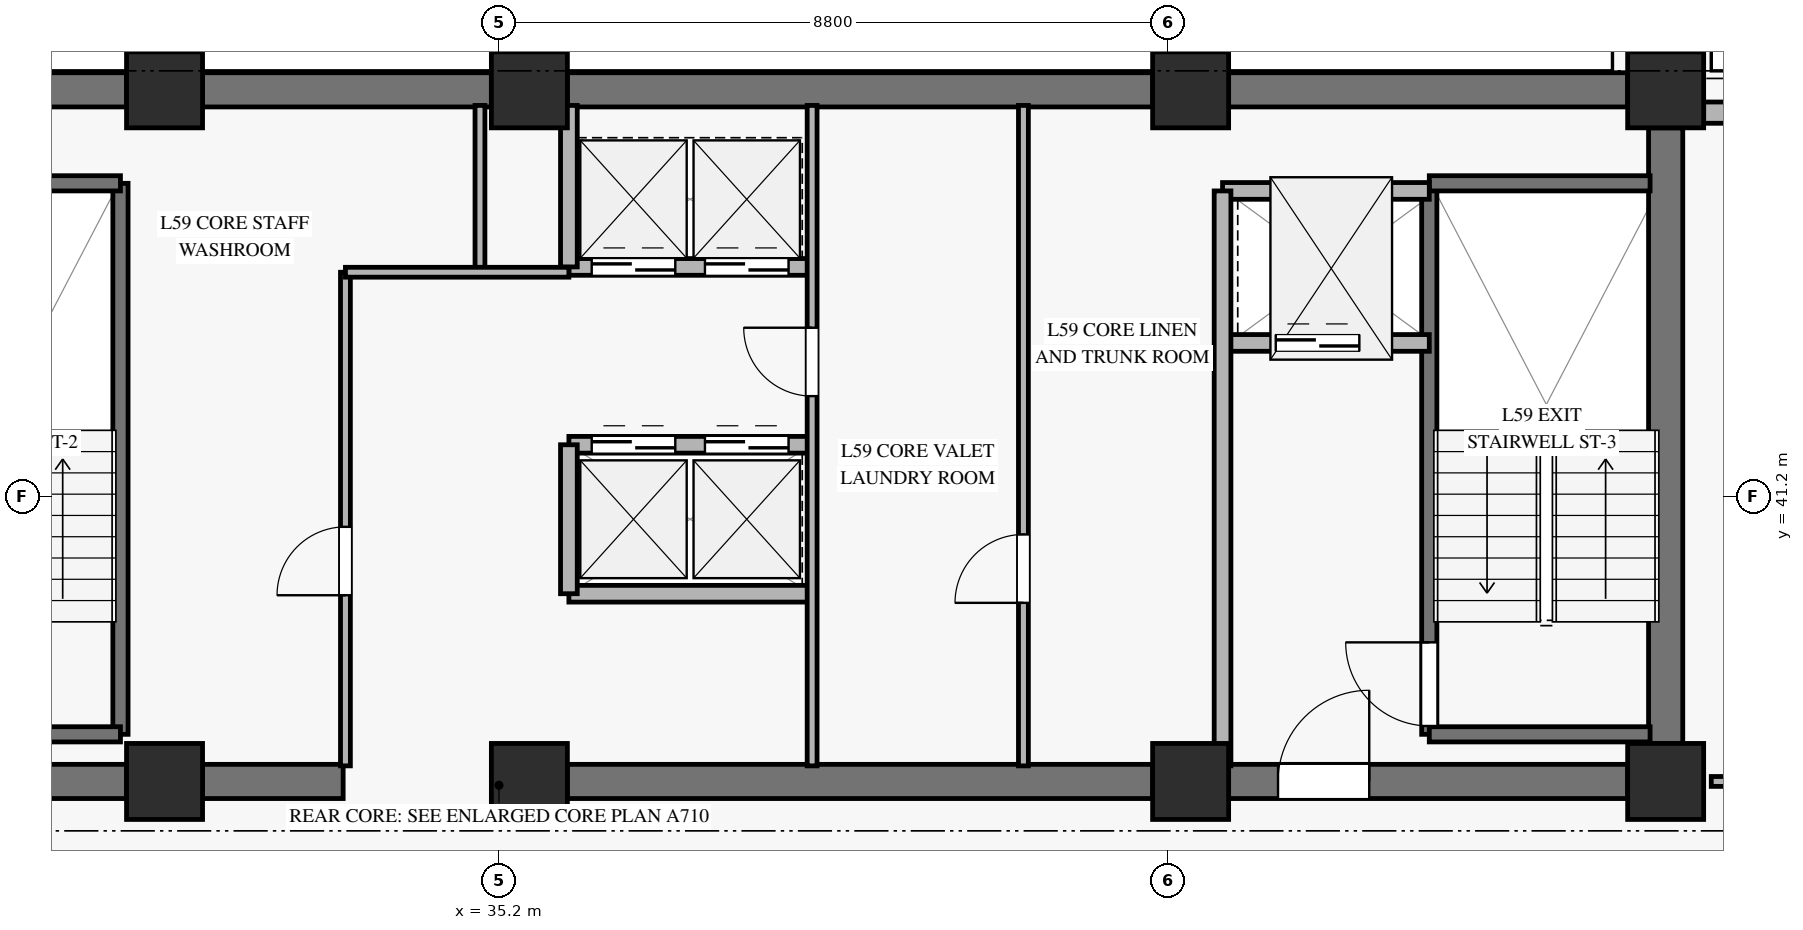
"""IFC4 building model, lengths in metres.
Left out: names, types, materials, properties, quantities, classifications, styles, units other than length and angle.
Written with IfcOpenShell. Run it as: python <this file> out.ifc"""

import sys

from ifc_helpers import new_model, si_unit, direction, frame, frame_2d, origin, origin_2d, place, context, subcontext, project, spatial, rectangle, extrude, source, transform, mapped, element, fill, save


model = new_model("IFC4")
c1 = context("Model", 3, precision=1e-05, world=origin(), true_north=direction((0.0, 1.0)))
c2 = subcontext(c1, "Body", "Model", "MODEL_VIEW")
j1 = project(units=[si_unit("LENGTHUNIT", "METRE"), si_unit("PLANEANGLEUNIT", "RADIAN")], contexts=[c1])
p1 = place(None, origin())
s1 = spatial("IfcSite", under=j1, at=p1, CompositionType="ELEMENT")
p2 = place(p1, origin())
s2 = spatial("IfcBuilding", under=s1, at=p2, CompositionType="ELEMENT")
p3 = place(p2, frame((0.0, 0.0, 233.8)))
s3 = spatial("IfcBuildingStorey", under=s2, at=p3, CompositionType="ELEMENT", Elevation=233.8)
m1 = source(origin(), c2, "Body", "SweptSolid", [
    extrude(rectangle(XDim=1.0, YDim=1.0, at=origin_2d()), origin(), (0.0, 0.0, 1.0), 3.12),
])
for number, where, z_axis, x_axis in (
    (1, (30.8, 37.45, 0.0), (0.0, 0.0, 1.0), (1.0, 0.0, 0.0)),
    (2, (30.8, 46.55, 0.0), (0.0, 0.0, 1.0), (1.0, 0.0, 0.0)),
    (3, (35.6, 37.45, 0.0), (0.0, 0.0, 1.0), (1.0, 0.0, 0.0)),
    (4, (35.6, 46.55, 0.0), (0.0, 0.0, 1.0), (1.0, 0.0, 0.0)),
    (5, (44.3, 37.45, 0.0), (0.0, 0.0, 1.0), (1.0, 0.0, 0.0)),
    (6, (44.3, 46.55, 0.0), (0.0, 0.0, 1.0), (1.0, 0.0, 0.0)),
    (7, (50.55, 37.45, 0.0), (0.0, 0.0, 1.0), (1.0, 0.0, 0.0)),
    (8, (50.55, 46.55, 0.0), (0.0, 0.0, 1.0), (1.0, 0.0, 0.0)),
):
    element("IfcColumn", number, at=place(p3, frame(where, z_axis=z_axis, x_axis=x_axis)), inside=s3, PredefinedType="PILASTER", context=c2, shape_type="MappedRepresentation", body=[
        mapped(m1, transform((0.0, 0.0, 0.0), x_axis=(1.0, 0.0, 0.0), y_axis=(0.0, 1.0, 0.0), z_axis=(0.0, 0.0, 1.0), scale=1.0)),
    ])
p4 = place(p3, frame((20.35, 46.55, 0.0), z_axis=(0.0, 0.0, 1.0), x_axis=(1.0, 0.0, 0.0)))
e9 = element("IfcWall", 9, at=p4, inside=s3, PredefinedType="SHEAR", context=c2, shape_type="SweptSolid", body=[
    extrude(rectangle(XDim=9.95, YDim=0.45, at=frame_2d((4.975, 0.0))), origin(), (0.0, 0.0, 1.0), 3.12),
])
p5 = place(p3, frame((31.3, 46.55, 0.0), z_axis=(0.0, 0.0, 1.0), x_axis=(1.0, 0.0, 0.0)))
e10 = element("IfcWall", 10, at=p5, inside=s3, PredefinedType="SHEAR", context=c2, shape_type="SweptSolid", body=[
    extrude(rectangle(XDim=3.8, YDim=0.45, at=frame_2d((1.9, 0.0))), origin(), (0.0, 0.0, 1.0), 3.12),
])
p6 = place(p3, frame((36.1, 46.55, 0.0), z_axis=(0.0, 0.0, 1.0), x_axis=(1.0, 0.0, 0.0)))
e11 = element("IfcWall", 11, at=p6, inside=s3, PredefinedType="SHEAR", context=c2, shape_type="SweptSolid", body=[
    extrude(rectangle(XDim=7.7, YDim=0.45, at=frame_2d((3.85, 0.0))), origin(), (0.0, 0.0, 1.0), 3.12),
])
p7 = place(p3, frame((44.8, 46.55, 0.0), z_axis=(0.0, 0.0, 1.0), x_axis=(1.0, 0.0, 0.0)))
e12 = element("IfcWall", 12, at=p7, inside=s3, PredefinedType="SHEAR", context=c2, shape_type="SweptSolid", body=[
    extrude(rectangle(XDim=5.25, YDim=0.45, at=frame_2d((2.625, 0.0))), origin(), (0.0, 0.0, 1.0), 3.12),
])
p8 = place(p3, frame((20.35, 37.45, 0.0), z_axis=(0.0, 0.0, 1.0), x_axis=(1.0, 0.0, 0.0)))
e13 = element("IfcWall", 13, at=p8, inside=s3, PredefinedType="SHEAR", context=c2, shape_type="SweptSolid", body=[
    extrude(rectangle(XDim=9.95, YDim=0.45, at=frame_2d((4.975, 0.0))), origin(), (0.0, 0.0, 1.0), 3.12),
])
p9 = place(p8, frame((4.2, 0.0, 0.0)))
e14 = element("IfcOpeningElement", 14, at=p9, cuts=e13, PredefinedType="OPENING", context=c2, shape_type="SweptSolid", body=[
    extrude(rectangle(XDim=1.2, YDim=2.15, at=frame_2d((0.6, 1.075))), frame((0.0, 0.235, 0.0), z_axis=(0.0, -1.0, 0.0), x_axis=(1.0, 0.0, 0.0)), (0.0, 0.0, 1.0), 0.47),
])
p10 = place(p3, frame((31.3, 37.45, 0.0), z_axis=(0.0, 0.0, 1.0), x_axis=(1.0, 0.0, 0.0)))
e15 = element("IfcWall", 15, at=p10, inside=s3, PredefinedType="SHEAR", context=c2, shape_type="SweptSolid", body=[
    extrude(rectangle(XDim=1.85, YDim=0.45, at=frame_2d((0.925, 0.0))), origin(), (0.0, 0.0, 1.0), 3.12),
])
p11 = place(p3, frame((36.1, 37.45, 0.0), z_axis=(0.0, 0.0, 1.0), x_axis=(1.0, 0.0, 0.0)))
e16 = element("IfcWall", 16, at=p11, inside=s3, PredefinedType="SHEAR", context=c2, shape_type="SweptSolid", body=[
    extrude(rectangle(XDim=7.7, YDim=0.45, at=frame_2d((3.85, 0.0))), origin(), (0.0, 0.0, 1.0), 3.12),
])
p12 = place(p3, frame((44.8, 37.45, 0.0), z_axis=(0.0, 0.0, 1.0), x_axis=(1.0, 0.0, 0.0)))
e17 = element("IfcWall", 17, at=p12, inside=s3, PredefinedType="SHEAR", context=c2, shape_type="SweptSolid", body=[
    extrude(rectangle(XDim=5.25, YDim=0.45, at=frame_2d((2.625, 0.0))), origin(), (0.0, 0.0, 1.0), 3.12),
])
p13 = place(p12, frame((0.65, 0.0, 0.0)))
e18 = element("IfcOpeningElement", 18, at=p13, cuts=e17, PredefinedType="OPENING", context=c2, shape_type="SweptSolid", body=[
    extrude(rectangle(XDim=1.2, YDim=2.15, at=frame_2d((0.6, 1.075))), frame((0.0, 0.235, 0.0), z_axis=(0.0, -1.0, 0.0), x_axis=(1.0, 0.0, 0.0)), (0.0, 0.0, 1.0), 0.47),
])
p14 = place(p3, frame((50.55, 37.95, 0.0), z_axis=(0.0, 0.0, 1.0), x_axis=(0.0, 1.0, 0.0)))
e19 = element("IfcWall", 19, at=p14, inside=s3, PredefinedType="SHEAR", context=c2, shape_type="SweptSolid", body=[
    extrude(rectangle(XDim=8.1, YDim=0.45, at=frame_2d((4.05, 0.0))), origin(), (0.0, 0.0, 1.0), 3.12),
])
p15 = place(p3, frame((51.05, 46.25, 0.0), z_axis=(0.0, 0.0, 1.0), x_axis=(1.0, 0.0, 0.0)))
e20 = element("IfcWall", 20, at=p15, inside=s3, PredefinedType="SOLIDWALL", context=c2, shape_type="SweptSolid", body=[
    extrude(rectangle(XDim=8.81, YDim=0.28, at=frame_2d((4.405, 0.0))), origin(), (0.0, 0.0, 1.0), 2.75),
])
p16 = place(p15, frame((3.605, 0.0, 0.45)))
e21 = element("IfcOpeningElement", 21, at=p16, cuts=e20, PredefinedType="OPENING", context=c2, shape_type="SweptSolid", body=[
    extrude(rectangle(XDim=1.6, YDim=2.0, at=frame_2d((0.8, 1.0))), frame((0.0, 0.15, 0.0), z_axis=(0.0, -1.0, 0.0), x_axis=(1.0, 0.0, 0.0)), (0.0, 0.0, 1.0), 0.3),
])
p17 = place(p3, frame((30.22, 38.07, 0.0), z_axis=(0.0, 0.0, 1.0), x_axis=(0.0, 1.0, 0.0)))
e22 = element("IfcWall", 22, at=p17, inside=s3, PredefinedType="SOLIDWALL", context=c2, shape_type="SweptSolid", body=[
    extrude(rectangle(XDim=7.25, YDim=0.2, at=frame_2d((3.625, 0.0))), origin(), (0.0, 0.0, 1.0), 3.4),
])
for number, where, z_axis, x_axis in (
    (23, (27.14, 45.32, 0.0), (0.0, 0.0, 1.0), (1.0, 0.0, 0.0)),
    (24, (27.14, 38.07, 0.0), (0.0, 0.0, 1.0), (1.0, 0.0, 0.0)),
):
    element("IfcWall", number, at=place(p3, frame(where, z_axis=z_axis, x_axis=x_axis)), inside=s3, PredefinedType="SOLIDWALL", context=c2, shape_type="SweptSolid", body=[
        extrude(rectangle(XDim=3.08, YDim=0.2, at=frame_2d((1.54, 0.0))), origin(), (0.0, 0.0, 1.0), 3.4),
    ])
p18 = place(p3, frame((47.44, 38.07, 0.0), z_axis=(0.0, 0.0, 1.0), x_axis=(0.0, 1.0, 0.0)))
e25 = element("IfcWall", 25, at=p18, inside=s3, PredefinedType="SOLIDWALL", context=c2, shape_type="SweptSolid", body=[
    extrude(rectangle(XDim=7.25, YDim=0.2, at=frame_2d((3.625, 0.0))), origin(), (0.0, 0.0, 1.0), 3.4),
])
p19 = place(p18, frame((0.11, 0.0, 0.0)))
e26 = element("IfcOpeningElement", 26, at=p19, cuts=e25, PredefinedType="OPENING", context=c2, shape_type="SweptSolid", body=[
    extrude(rectangle(XDim=1.1, YDim=2.15, at=frame_2d((0.55, 1.075))), frame((0.0, 0.11, 0.0), z_axis=(0.0, -1.0, 0.0), x_axis=(1.0, 0.0, 0.0)), (0.0, 0.0, 1.0), 0.22),
])
for number, where, z_axis, x_axis in (
    (27, (47.44, 45.32, 0.0), (0.0, 0.0, 1.0), (1.0, 0.0, 0.0)),
    (28, (47.44, 38.07, 0.0), (0.0, 0.0, 1.0), (1.0, 0.0, 0.0)),
):
    element("IfcWall", number, at=place(p3, frame(where, z_axis=z_axis, x_axis=x_axis)), inside=s3, PredefinedType="SOLIDWALL", context=c2, shape_type="SweptSolid", body=[
        extrude(rectangle(XDim=2.905, YDim=0.2, at=frame_2d((1.453, 0.0))), origin(), (0.0, 0.0, 1.0), 3.4),
    ])
p20 = place(p3, frame((44.72, 43.22, 0.0), z_axis=(0.0, 0.0, 1.0), x_axis=(1.0, 0.0, 0.0)))
e29 = element("IfcWall", 29, at=p20, inside=s3, PredefinedType="SOLIDWALL", context=c2, shape_type="SweptSolid", body=[
    extrude(rectangle(XDim=2.72, YDim=0.22, at=frame_2d((1.36, 0.0))), origin(), (0.0, 0.0, 1.0), 3.12),
])
p21 = place(p20, frame((0.7, 0.0, 0.0)))
e30 = element("IfcOpeningElement", 30, at=p21, cuts=e29, PredefinedType="OPENING", context=c2, shape_type="SweptSolid", body=[
    extrude(rectangle(XDim=1.1, YDim=2.2, at=frame_2d((0.55, 1.1))), frame((0.0, 0.12, 0.0), z_axis=(0.0, -1.0, 0.0), x_axis=(1.0, 0.0, 0.0)), (0.0, 0.0, 1.0), 0.24),
])
p22 = place(p3, frame((44.72, 45.22, 0.0), z_axis=(0.0, 0.0, 1.0), x_axis=(1.0, 0.0, 0.0)))
e31 = element("IfcWall", 31, at=p22, inside=s3, PredefinedType="SOLIDWALL", context=c2, shape_type="SweptSolid", body=[
    extrude(rectangle(XDim=2.72, YDim=0.22, at=frame_2d((1.36, 0.0))), origin(), (0.0, 0.0, 1.0), 3.12),
])
p23 = place(p3, frame((44.72, 37.655, 0.0), z_axis=(0.0, 0.0, 1.0), x_axis=(0.0, 1.0, 0.0)))
e32 = element("IfcWall", 32, at=p23, inside=s3, PredefinedType="SOLIDWALL", context=c2, shape_type="SweptSolid", body=[
    extrude(rectangle(XDim=7.565, YDim=0.22, at=frame_2d((3.782, 0.0))), origin(), (0.0, 0.0, 1.0), 3.12),
])
p24 = place(p3, frame((36.12, 44.22, 0.0), z_axis=(0.0, 0.0, 1.0), x_axis=(1.0, 0.0, 0.0)))
e33 = element("IfcWall", 33, at=p24, inside=s3, PredefinedType="SOLIDWALL", context=c2, shape_type="SweptSolid", body=[
    extrude(rectangle(XDim=3.2, YDim=0.22, at=frame_2d((1.6, 0.0))), origin(), (0.0, 0.0, 1.0), 3.12),
])
p25 = place(p24, frame((0.3, 0.0, 0.0)))
e34 = element("IfcOpeningElement", 34, at=p25, cuts=e33, PredefinedType="OPENING", context=c2, shape_type="SweptSolid", body=[
    extrude(rectangle(XDim=1.1, YDim=2.2, at=frame_2d((0.55, 1.1))), frame((0.0, 0.12, 0.0), z_axis=(0.0, -1.0, 0.0), x_axis=(1.0, 0.0, 0.0)), (0.0, 0.0, 1.0), 0.24),
])
p26 = place(p24, frame((1.79, 0.0, 0.0)))
e35 = element("IfcOpeningElement", 35, at=p26, cuts=e33, PredefinedType="OPENING", context=c2, shape_type="SweptSolid", body=[
    extrude(rectangle(XDim=1.1, YDim=2.2, at=frame_2d((0.55, 1.1))), frame((0.0, 0.12, 0.0), z_axis=(0.0, -1.0, 0.0), x_axis=(1.0, 0.0, 0.0)), (0.0, 0.0, 1.0), 0.24),
])
p27 = place(p3, frame((36.12, 41.88, 0.0), z_axis=(0.0, 0.0, 1.0), x_axis=(1.0, 0.0, 0.0)))
e36 = element("IfcWall", 36, at=p27, inside=s3, PredefinedType="SOLIDWALL", context=c2, shape_type="SweptSolid", body=[
    extrude(rectangle(XDim=3.2, YDim=0.22, at=frame_2d((1.6, 0.0))), origin(), (0.0, 0.0, 1.0), 3.12),
])
p28 = place(p27, frame((0.3, 0.0, 0.0)))
e37 = element("IfcOpeningElement", 37, at=p28, cuts=e36, PredefinedType="OPENING", context=c2, shape_type="SweptSolid", body=[
    extrude(rectangle(XDim=1.1, YDim=2.2, at=frame_2d((0.55, 1.1))), frame((0.0, 0.12, 0.0), z_axis=(0.0, -1.0, 0.0), x_axis=(1.0, 0.0, 0.0)), (0.0, 0.0, 1.0), 0.24),
])
p29 = place(p27, frame((1.79, 0.0, 0.0)))
e38 = element("IfcOpeningElement", 38, at=p29, cuts=e36, PredefinedType="OPENING", context=c2, shape_type="SweptSolid", body=[
    extrude(rectangle(XDim=1.1, YDim=2.2, at=frame_2d((0.55, 1.1))), frame((0.0, 0.12, 0.0), z_axis=(0.0, -1.0, 0.0), x_axis=(1.0, 0.0, 0.0)), (0.0, 0.0, 1.0), 0.24),
])
p30 = place(p3, frame((36.12, 39.92, 0.0), z_axis=(0.0, 0.0, 1.0), x_axis=(1.0, 0.0, 0.0)))
e39 = element("IfcWall", 39, at=p30, inside=s3, PredefinedType="SOLIDWALL", context=c2, shape_type="SweptSolid", body=[
    extrude(rectangle(XDim=3.2, YDim=0.22, at=frame_2d((1.6, 0.0))), origin(), (0.0, 0.0, 1.0), 3.12),
])
p31 = place(p3, frame((36.12, 39.92, 0.0), z_axis=(0.0, 0.0, 1.0), x_axis=(0.0, 1.0, 0.0)))
e40 = element("IfcWall", 40, at=p31, inside=s3, PredefinedType="SOLIDWALL", context=c2, shape_type="SweptSolid", body=[
    extrude(rectangle(XDim=1.96, YDim=0.22, at=frame_2d((0.98, 0.0))), origin(), (0.0, 0.0, 1.0), 3.12),
])
p32 = place(p3, frame((36.12, 44.22, 0.0), z_axis=(0.0, 0.0, 1.0), x_axis=(0.0, 1.0, 0.0)))
e41 = element("IfcWall", 41, at=p32, inside=s3, PredefinedType="SOLIDWALL", context=c2, shape_type="SweptSolid", body=[
    extrude(rectangle(XDim=2.125, YDim=0.22, at=frame_2d((1.062, 0.0))), origin(), (0.0, 0.0, 1.0), 3.12),
])
p33 = place(p3, frame((33.18, 37.655, 0.0), z_axis=(0.0, 0.0, 1.0), x_axis=(0.0, 1.0, 0.0)))
e42 = element("IfcWall", 42, at=p33, inside=s3, PredefinedType="PARTITIONING", context=c2, shape_type="SweptSolid", body=[
    extrude(rectangle(XDim=6.495, YDim=0.13, at=frame_2d((3.248, 0.0))), origin(), (0.0, 0.0, 1.0), 2.22),
])
p34 = place(p33, frame((2.245, 0.0, 0.0)))
e43 = element("IfcOpeningElement", 43, at=p34, cuts=e42, PredefinedType="OPENING", context=c2, shape_type="SweptSolid", body=[
    extrude(rectangle(XDim=0.9, YDim=2.1, at=frame_2d((0.45, 1.05))), frame((0.0, 0.075, 0.0), z_axis=(0.0, -1.0, 0.0), x_axis=(1.0, 0.0, 0.0)), (0.0, 0.0, 1.0), 0.15),
])
p35 = place(p3, frame((34.95, 44.15, 0.0), z_axis=(0.0, 0.0, 1.0), x_axis=(0.0, 1.0, 0.0)))
e44 = element("IfcWall", 44, at=p35, inside=s3, PredefinedType="PARTITIONING", context=c2, shape_type="SweptSolid", body=[
    extrude(rectangle(XDim=2.195, YDim=0.13, at=frame_2d((1.098, 0.0))), origin(), (0.0, 0.0, 1.0), 3.12),
])
p36 = place(p3, frame((33.18, 44.15, 0.0), z_axis=(0.0, 0.0, 1.0), x_axis=(1.0, 0.0, 0.0)))
e45 = element("IfcWall", 45, at=p36, inside=s3, PredefinedType="PARTITIONING", context=c2, shape_type="SweptSolid", body=[
    extrude(rectangle(XDim=2.94, YDim=0.13, at=frame_2d((1.47, 0.0))), origin(), (0.0, 0.0, 1.0), 2.405),
])
p37 = place(p3, frame((39.32, 37.655, 0.0), z_axis=(0.0, 0.0, 1.0), x_axis=(0.0, 1.0, 0.0)))
e46 = element("IfcWall", 46, at=p37, inside=s3, PredefinedType="PARTITIONING", context=c2, shape_type="SweptSolid", body=[
    extrude(rectangle(XDim=8.69, YDim=0.13, at=frame_2d((4.345, 0.0))), origin(), (0.0, 0.0, 1.0), 3.12),
])
p38 = place(p37, frame((4.865, 0.0, 0.0)))
e47 = element("IfcOpeningElement", 47, at=p38, cuts=e46, PredefinedType="OPENING", context=c2, shape_type="SweptSolid", body=[
    extrude(rectangle(XDim=0.9, YDim=2.1, at=frame_2d((0.45, 1.05))), frame((0.0, 0.075, 0.0), z_axis=(0.0, -1.0, 0.0), x_axis=(1.0, 0.0, 0.0)), (0.0, 0.0, 1.0), 0.15),
])
p39 = place(p3, frame((42.1, 37.655, 0.0), z_axis=(0.0, 0.0, 1.0), x_axis=(0.0, 1.0, 0.0)))
e48 = element("IfcWall", 48, at=p39, inside=s3, PredefinedType="PARTITIONING", context=c2, shape_type="SweptSolid", body=[
    extrude(rectangle(XDim=8.69, YDim=0.13, at=frame_2d((4.345, 0.0))), origin(), (0.0, 0.0, 1.0), 3.12),
])
p40 = place(p39, frame((2.145, 0.0, 0.0)))
e49 = element("IfcOpeningElement", 49, at=p40, cuts=e48, PredefinedType="OPENING", context=c2, shape_type="SweptSolid", body=[
    extrude(rectangle(XDim=0.9, YDim=2.1, at=frame_2d((0.45, 1.05))), frame((0.0, 0.075, 0.0), z_axis=(0.0, -1.0, 0.0), x_axis=(1.0, 0.0, 0.0)), (0.0, 0.0, 1.0), 0.15),
])
p41 = place(p3, frame((51.15, 37.45, 0.0), z_axis=(0.0, 0.0, 1.0), x_axis=(1.0, 0.0, 0.0)))
e50 = element("IfcWall", 50, at=p41, inside=s3, PredefinedType="PARTITIONING", context=c2, shape_type="SweptSolid", body=[
    extrude(rectangle(XDim=11.717, YDim=0.13, at=frame_2d((5.858, 0.0))), origin(), (0.0, 0.0, 1.0), 2.755),
])
p42 = place(p41, frame((0.5, 0.0, 0.0)))
e51 = element("IfcOpeningElement", 51, at=p42, cuts=e50, PredefinedType="OPENING", context=c2, shape_type="SweptSolid", body=[
    extrude(rectangle(XDim=0.9, YDim=2.1, at=frame_2d((0.45, 1.05))), frame((0.0, 0.075, 0.0), z_axis=(0.0, -1.0, 0.0), x_axis=(1.0, 0.0, 0.0)), (0.0, 0.0, 1.0), 0.15),
])
p43 = place(p41, frame((8.351, 0.0, 0.0)))
e52 = element("IfcOpeningElement", 52, at=p43, cuts=e50, PredefinedType="OPENING", context=c2, shape_type="SweptSolid", body=[
    extrude(rectangle(XDim=0.95, YDim=2.1, at=frame_2d((0.475, 1.05))), frame((0.0, 0.075, 0.0), z_axis=(0.0, -1.0, 0.0), x_axis=(1.0, 0.0, 0.0)), (0.0, 0.0, 1.0), 0.15),
])
m2 = source(origin(), c2, "Body", "SweptSolid", [
    extrude(rectangle(XDim=1.1, YDim=2.15, at=frame_2d((0.55, 1.075))), frame((0.0, 0.025, 0.0), z_axis=(0.0, -1.0, 0.0), x_axis=(1.0, 0.0, 0.0)), (0.0, 0.0, 1.0), 0.05),
])
p44 = place(p19, origin())
e53 = element("IfcDoor", 53, at=p44, inside=s3, OperationType="SINGLE_SWING_RIGHT", PredefinedType="DOOR", context=c2, shape_type="MappedRepresentation", body=[
    mapped(m2, transform((0.0, 0.0, 0.0), x_axis=(1.0, 0.0, 0.0), y_axis=(0.0, 1.0, 0.0), z_axis=(0.0, 0.0, 1.0), scale=1.0)),
])
fill(e26, e53)
m3 = source(origin(), c2, "Body", "SweptSolid", [
    extrude(rectangle(XDim=1.1, YDim=2.2, at=frame_2d((0.55, 1.1))), frame((0.0, 0.025, 0.0), z_axis=(0.0, -1.0, 0.0), x_axis=(1.0, 0.0, 0.0)), (0.0, 0.0, 1.0), 0.05),
])
p45 = place(p21, origin())
e54 = element("IfcDoor", 54, at=p45, inside=s3, OperationType="SLIDING_TO_LEFT", PredefinedType="DOOR", context=c2, shape_type="MappedRepresentation", body=[
    mapped(m3, transform((0.0, 0.0, 0.0), x_axis=(1.0, 0.0, 0.0), y_axis=(0.0, 1.0, 0.0), z_axis=(0.0, 0.0, 1.0), scale=1.0)),
])
fill(e30, e54)
m4 = source(origin(), c2, "Body", "SweptSolid", [
    extrude(rectangle(XDim=1.2, YDim=2.15, at=frame_2d((0.6, 1.075))), frame((0.0, 0.025, 0.0), z_axis=(0.0, -1.0, 0.0), x_axis=(1.0, 0.0, 0.0)), (0.0, 0.0, 1.0), 0.05),
])
p46 = place(p13, origin())
e55 = element("IfcDoor", 55, at=p46, inside=s3, OperationType="SINGLE_SWING_RIGHT", PredefinedType="DOOR", context=c2, shape_type="MappedRepresentation", body=[
    mapped(m4, transform((0.0, 0.0, 0.0), x_axis=(1.0, 0.0, 0.0), y_axis=(0.0, 1.0, 0.0), z_axis=(0.0, 0.0, 1.0), scale=1.0)),
])
fill(e18, e55)
p47 = place(p25, origin())
e56 = element("IfcDoor", 56, at=p47, inside=s3, OperationType="SLIDING_TO_LEFT", PredefinedType="DOOR", context=c2, shape_type="MappedRepresentation", body=[
    mapped(m3, transform((0.0, 0.0, 0.0), x_axis=(1.0, 0.0, 0.0), y_axis=(0.0, 1.0, 0.0), z_axis=(0.0, 0.0, 1.0), scale=1.0)),
])
fill(e34, e56)
p48 = place(p26, origin())
e57 = element("IfcDoor", 57, at=p48, inside=s3, OperationType="SLIDING_TO_LEFT", PredefinedType="DOOR", context=c2, shape_type="MappedRepresentation", body=[
    mapped(m3, transform((0.0, 0.0, 0.0), x_axis=(1.0, 0.0, 0.0), y_axis=(0.0, 1.0, 0.0), z_axis=(0.0, 0.0, 1.0), scale=1.0)),
])
fill(e35, e57)
p49 = place(p28, origin())
e58 = element("IfcDoor", 58, at=p49, inside=s3, OperationType="SLIDING_TO_LEFT", PredefinedType="DOOR", context=c2, shape_type="MappedRepresentation", body=[
    mapped(m3, transform((0.0, 0.0, 0.0), x_axis=(1.0, 0.0, 0.0), y_axis=(0.0, 1.0, 0.0), z_axis=(0.0, 0.0, 1.0), scale=1.0)),
])
fill(e37, e58)
p50 = place(p29, origin())
e59 = element("IfcDoor", 59, at=p50, inside=s3, OperationType="SLIDING_TO_LEFT", PredefinedType="DOOR", context=c2, shape_type="MappedRepresentation", body=[
    mapped(m3, transform((0.0, 0.0, 0.0), x_axis=(1.0, 0.0, 0.0), y_axis=(0.0, 1.0, 0.0), z_axis=(0.0, 0.0, 1.0), scale=1.0)),
])
fill(e38, e59)
m5 = source(origin(), c2, "Body", "SweptSolid", [
    extrude(rectangle(XDim=0.9, YDim=2.1, at=frame_2d((0.45, 1.05))), frame((0.0, 0.025, 0.0), z_axis=(0.0, -1.0, 0.0), x_axis=(1.0, 0.0, 0.0)), (0.0, 0.0, 1.0), 0.05),
])
p51 = place(p34, origin())
e60 = element("IfcDoor", 60, at=p51, inside=s3, OperationType="SINGLE_SWING_LEFT", PredefinedType="DOOR", context=c2, shape_type="MappedRepresentation", body=[
    mapped(m5, transform((0.0, 0.0, 0.0), x_axis=(1.0, 0.0, 0.0), y_axis=(0.0, 1.0, 0.0), z_axis=(0.0, 0.0, 1.0), scale=1.0)),
])
fill(e43, e60)
p52 = place(p38, origin())
e61 = element("IfcDoor", 61, at=p52, inside=s3, OperationType="SINGLE_SWING_RIGHT", PredefinedType="DOOR", context=c2, shape_type="MappedRepresentation", body=[
    mapped(m5, transform((0.0, 0.0, 0.0), x_axis=(1.0, 0.0, 0.0), y_axis=(0.0, 1.0, 0.0), z_axis=(0.0, 0.0, 1.0), scale=1.0)),
])
fill(e47, e61)
p53 = place(p40, origin())
e62 = element("IfcDoor", 62, at=p53, inside=s3, OperationType="SINGLE_SWING_LEFT", PredefinedType="DOOR", context=c2, shape_type="MappedRepresentation", body=[
    mapped(m5, transform((0.0, 0.0, 0.0), x_axis=(1.0, 0.0, 0.0), y_axis=(0.0, 1.0, 0.0), z_axis=(0.0, 0.0, 1.0), scale=1.0)),
])
fill(e49, e62)
save(model, sys.argv[1])
